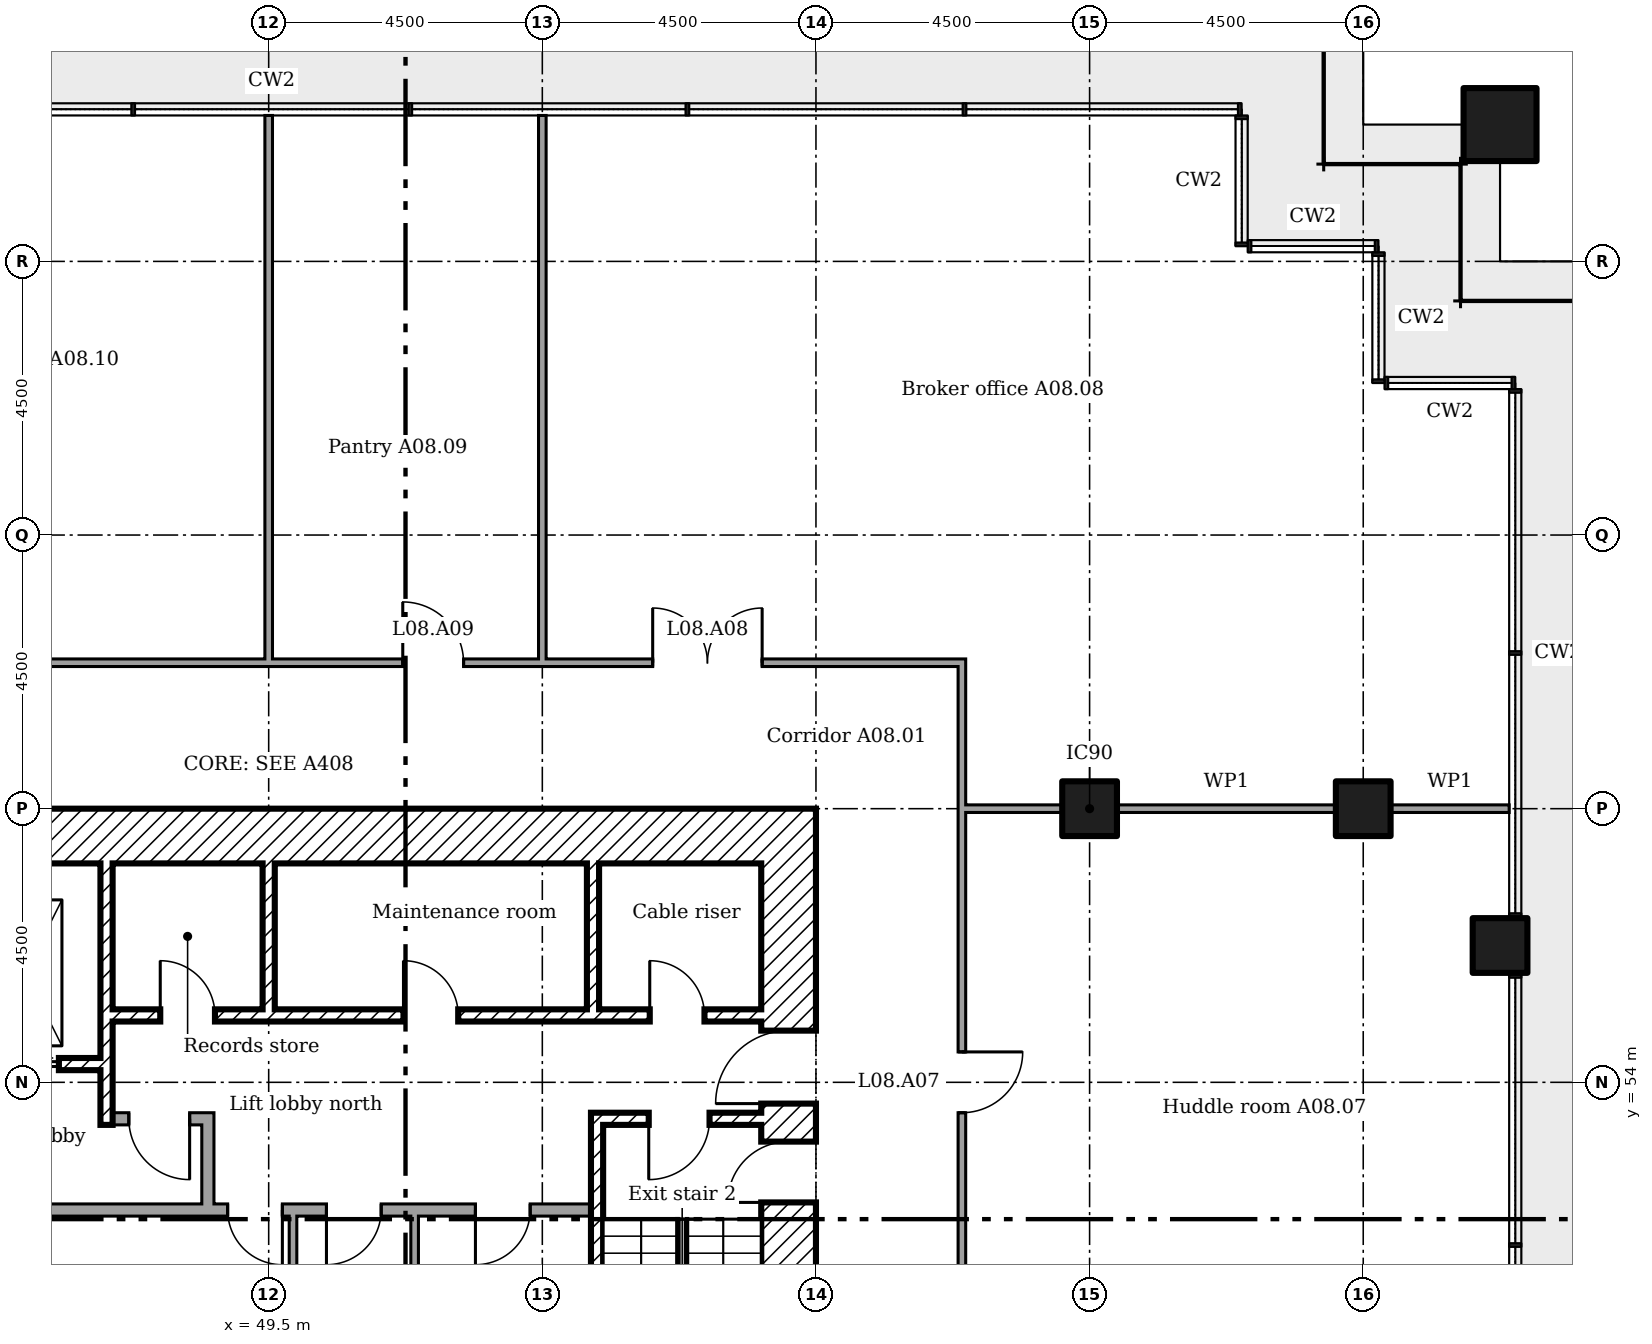
"""IFC4 building model, lengths in metres.
Left out: names, types, materials, properties, quantities, classifications, styles, units other than length and angle.
Written with IfcOpenShell. Run it as: python <this file> out.ifc"""

import sys

from ifc_helpers import new_model, si_unit, direction, frame, frame_2d, origin, origin_2d, place, context, subcontext, project, spatial, rectangle, extrude, element, fill, save


model = new_model("IFC4")
c1 = context("Model", 3, precision=1e-05, world=origin(), true_north=direction((0.0, 1.0)))
c2 = subcontext(c1, "Body", "Model", "MODEL_VIEW")
j1 = project(units=[si_unit("LENGTHUNIT", "METRE"), si_unit("PLANEANGLEUNIT", "RADIAN")], contexts=[c1])
p1 = place(None, origin())
s1 = spatial("IfcSite", under=j1, at=p1, CompositionType="ELEMENT")
p2 = place(p1, origin())
s2 = spatial("IfcBuilding", under=s1, at=p2, CompositionType="ELEMENT")
p3 = place(p2, frame((0.0, 0.0, 38.6)))
s3 = spatial("IfcBuildingStorey", under=s2, at=p3, CompositionType="ELEMENT", Elevation=38.6)
p4 = place(p3, frame((69.75, 69.75, 0.0)))
e1 = element("IfcColumn", 1, at=p4, inside=s3, PredefinedType="COLUMN", context=c2, shape_type="SweptSolid", body=[
    extrude(rectangle(XDim=1.2, YDim=1.2, at=origin_2d()), origin(), (0.0, 0.0, 1.0), 4.4),
])
for number, where in (
    (2, (63.0, 58.5, 0.0)),
    (3, (67.5, 58.5, 0.0)),
    (4, (69.75, 56.25, 0.0)),
):
    element("IfcColumn", number, at=place(p3, frame(where)), inside=s3, PredefinedType="COLUMN", context=c2, shape_type="SweptSolid", body=[
        extrude(rectangle(XDim=0.9, YDim=0.9, at=origin_2d()), origin(), (0.0, 0.0, 1.0), 4.4),
    ])
p5 = place(p3, frame((58.05, 40.5, 0.0), z_axis=(0.0, 0.0, 1.0), x_axis=(0.0, 1.0, 0.0)))
e5 = element("IfcWall", 5, at=p5, inside=s3, PredefinedType="SHEAR", context=c2, shape_type="SweptSolid", body=[
    extrude(rectangle(XDim=18.0, YDim=0.9, at=frame_2d((9.0, 0.0))), origin(), (0.0, 0.0, 1.0), 4.125),
])
p6 = place(p5, frame((13.15, 0.0, 0.0)))
e6 = element("IfcOpeningElement", 6, at=p6, cuts=e5, PredefinedType="OPENING", context=c2, shape_type="SweptSolid", body=[
    extrude(rectangle(XDim=1.2, YDim=2.1, at=frame_2d((0.6, 1.05))), frame((0.0, 0.46, 0.0), z_axis=(0.0, -1.0, 0.0), x_axis=(1.0, 0.0, 0.0)), (0.0, 0.0, 1.0), 0.92),
])
p7 = place(p5, frame((3.9, 0.0, 0.0)))
e7 = element("IfcOpeningElement", 7, at=p7, cuts=e5, PredefinedType="OPENING", context=c2, shape_type="SweptSolid", body=[
    extrude(rectangle(XDim=1.8, YDim=2.1, at=frame_2d((0.9, 1.05))), frame((0.0, 0.46, 0.0), z_axis=(0.0, -1.0, 0.0), x_axis=(1.0, 0.0, 0.0)), (0.0, 0.0, 1.0), 0.92),
])
p8 = place(p5, frame((11.525, 0.0, 0.0)))
e8 = element("IfcOpeningElement", 8, at=p8, cuts=e5, PredefinedType="OPENING", context=c2, shape_type="SweptSolid", body=[
    extrude(rectangle(XDim=1.0, YDim=2.1, at=frame_2d((0.5, 1.05))), frame((0.0, 0.46, 0.0), z_axis=(0.0, -1.0, 0.0), x_axis=(1.0, 0.0, 0.0)), (0.0, 0.0, 1.0), 0.92),
])
p9 = place(p3, frame((41.4, 58.05, 0.0)))
e9 = element("IfcWall", 9, at=p9, inside=s3, PredefinedType="SHEAR", context=c2, shape_type="SweptSolid", body=[
    extrude(rectangle(XDim=16.2, YDim=0.9, at=frame_2d((8.1, 0.0))), origin(), (0.0, 0.0, 1.0), 4.125),
])
p10 = place(p3, frame((46.833, 57.6, 0.0), z_axis=(0.0, 0.0, 1.0), x_axis=(0.0, -1.0, 0.0)))
e10 = element("IfcWall", 10, at=p10, inside=s3, PredefinedType="SHEAR", context=c2, shape_type="SweptSolid", body=[
    extrude(rectangle(XDim=4.3, YDim=0.2, at=frame_2d((2.15, 0.0))), origin(), (0.0, 0.0, 1.0), 4.125),
])
for number, where, z_axis, x_axis in (
    (11, (49.5, 57.6, 0.0), (0.0, 0.0, 1.0), (0.0, -1.0, 0.0)),
    (12, (54.833, 57.6, 0.0), (0.0, 0.0, 1.0), (0.0, -1.0, 0.0)),
):
    element("IfcWall", number, at=place(p3, frame(where, z_axis=z_axis, x_axis=x_axis)), inside=s3, PredefinedType="SHEAR", context=c2, shape_type="SweptSolid", body=[
        extrude(rectangle(XDim=2.4, YDim=0.2, at=frame_2d((1.2, 0.0))), origin(), (0.0, 0.0, 1.0), 4.125),
    ])
p11 = place(p3, frame((48.5, 51.9, 0.0), z_axis=(0.0, 0.0, 1.0), x_axis=(0.0, 1.0, 0.0)))
e13 = element("IfcWall", 13, at=p11, inside=s3, PredefinedType="PARTITIONING", context=c2, shape_type="SweptSolid", body=[
    extrude(rectangle(XDim=1.6, YDim=0.2, at=frame_2d((0.8, 0.0))), origin(), (0.0, 0.0, 1.0), 4.125),
])
p12 = place(p3, frame((46.933, 53.4, 0.0)))
e14 = element("IfcWall", 14, at=p12, inside=s3, PredefinedType="PARTITIONING", context=c2, shape_type="SweptSolid", body=[
    extrude(rectangle(XDim=1.467, YDim=0.2, at=frame_2d((0.733, 0.0))), origin(), (0.0, 0.0, 1.0), 4.125),
])
p13 = place(p12, frame((0.267, 0.0, 0.0)))
e15 = element("IfcOpeningElement", 15, at=p13, cuts=e14, PredefinedType="OPENING", context=c2, shape_type="SweptSolid", body=[
    extrude(rectangle(XDim=1.0, YDim=2.1, at=frame_2d((0.5, 1.05))), frame((0.0, 0.11, 0.0), z_axis=(0.0, -1.0, 0.0), x_axis=(1.0, 0.0, 0.0)), (0.0, 0.0, 1.0), 0.22),
])
p14 = place(p3, frame((46.933, 55.1, 0.0)))
e16 = element("IfcWall", 16, at=p14, inside=s3, PredefinedType="SHEAR", context=c2, shape_type="SweptSolid", body=[
    extrude(rectangle(XDim=10.667, YDim=0.2, at=frame_2d((5.333, 0.0))), origin(), (0.0, 0.0, 1.0), 4.125),
])
p15 = place(p14, frame((8.833, 0.0, 0.0)))
e17 = element("IfcOpeningElement", 17, at=p15, cuts=e16, PredefinedType="OPENING", context=c2, shape_type="SweptSolid", body=[
    extrude(rectangle(XDim=0.9, YDim=2.1, at=frame_2d((0.45, 1.05))), frame((0.0, 0.11, 0.0), z_axis=(0.0, -1.0, 0.0), x_axis=(1.0, 0.0, 0.0)), (0.0, 0.0, 1.0), 0.22),
])
p16 = place(p14, frame((0.783, 0.0, 0.0)))
e18 = element("IfcOpeningElement", 18, at=p16, cuts=e16, PredefinedType="OPENING", context=c2, shape_type="SweptSolid", body=[
    extrude(rectangle(XDim=0.9, YDim=2.1, at=frame_2d((0.45, 1.05))), frame((0.0, 0.11, 0.0), z_axis=(0.0, -1.0, 0.0), x_axis=(1.0, 0.0, 0.0)), (0.0, 0.0, 1.0), 0.22),
])
p17 = place(p14, frame((4.783, 0.0, 0.0)))
e19 = element("IfcOpeningElement", 19, at=p17, cuts=e16, PredefinedType="OPENING", context=c2, shape_type="SweptSolid", body=[
    extrude(rectangle(XDim=0.9, YDim=2.1, at=frame_2d((0.45, 1.05))), frame((0.0, 0.11, 0.0), z_axis=(0.0, -1.0, 0.0), x_axis=(1.0, 0.0, 0.0)), (0.0, 0.0, 1.0), 0.22),
])
p18 = place(p3, frame((41.4, 54.3, 0.0)))
e20 = element("IfcWall", 20, at=p18, inside=s3, PredefinedType="SHEAR", context=c2, shape_type="SweptSolid", body=[
    extrude(rectangle(XDim=5.333, YDim=0.2, at=frame_2d((2.667, 0.0))), origin(), (0.0, 0.0, 1.0), 4.125),
])
p19 = place(p18, frame((0.883, 0.0, 0.0)))
e21 = element("IfcOpeningElement", 21, at=p19, cuts=e20, PredefinedType="OPENING", context=c2, shape_type="SweptSolid", body=[
    extrude(rectangle(XDim=1.1, YDim=2.1, at=frame_2d((0.55, 1.05))), frame((0.0, 0.11, 0.0), z_axis=(0.0, -1.0, 0.0), x_axis=(1.0, 0.0, 0.0)), (0.0, 0.0, 1.0), 0.22),
])
p20 = place(p18, frame((3.55, 0.0, 0.0)))
e22 = element("IfcOpeningElement", 22, at=p20, cuts=e20, PredefinedType="OPENING", context=c2, shape_type="SweptSolid", body=[
    extrude(rectangle(XDim=1.1, YDim=2.1, at=frame_2d((0.55, 1.05))), frame((0.0, 0.11, 0.0), z_axis=(0.0, -1.0, 0.0), x_axis=(1.0, 0.0, 0.0)), (0.0, 0.0, 1.0), 0.22),
])
p21 = place(p3, frame((54.8, 53.4, 0.0)))
e23 = element("IfcWall", 23, at=p21, inside=s3, PredefinedType="SHEAR", context=c2, shape_type="SweptSolid", body=[
    extrude(rectangle(XDim=2.8, YDim=0.2, at=frame_2d((1.4, 0.0))), origin(), (0.0, 0.0, 1.0), 4.125),
])
p22 = place(p21, frame((0.95, 0.0, 0.0)))
e24 = element("IfcOpeningElement", 24, at=p22, cuts=e23, PredefinedType="OPENING", context=c2, shape_type="SweptSolid", body=[
    extrude(rectangle(XDim=1.0, YDim=2.1, at=frame_2d((0.5, 1.05))), frame((0.0, 0.11, 0.0), z_axis=(0.0, -1.0, 0.0), x_axis=(1.0, 0.0, 0.0)), (0.0, 0.0, 1.0), 0.22),
])
p23 = place(p3, frame((54.9, 46.8, 0.0), z_axis=(0.0, 0.0, 1.0), x_axis=(0.0, 1.0, 0.0)))
e25 = element("IfcWall", 25, at=p23, inside=s3, PredefinedType="SHEAR", context=c2, shape_type="SweptSolid", body=[
    extrude(rectangle(XDim=6.5, YDim=0.2, at=frame_2d((3.25, 0.0))), origin(), (0.0, 0.0, 1.0), 4.125),
])
p24 = place(p3, frame((44.2, 51.9, 0.0)))
e26 = element("IfcWall", 26, at=p24, inside=s3, PredefinedType="PARTITIONING", context=c2, shape_type="SweptSolid", body=[
    extrude(rectangle(XDim=10.6, YDim=0.2, at=frame_2d((5.3, 0.0))), origin(), (0.0, 0.0, 1.0), 4.125),
])
p25 = place(p24, frame((4.625, 0.0, 0.0)))
e27 = element("IfcOpeningElement", 27, at=p25, cuts=e26, PredefinedType="OPENING", context=c2, shape_type="SweptSolid", body=[
    extrude(rectangle(XDim=0.9, YDim=2.1, at=frame_2d((0.45, 1.05))), frame((0.0, 0.11, 0.0), z_axis=(0.0, -1.0, 0.0), x_axis=(1.0, 0.0, 0.0)), (0.0, 0.0, 1.0), 0.22),
])
p26 = place(p24, frame((6.25, 0.0, 0.0)))
e28 = element("IfcOpeningElement", 28, at=p26, cuts=e26, PredefinedType="OPENING", context=c2, shape_type="SweptSolid", body=[
    extrude(rectangle(XDim=0.9, YDim=2.1, at=frame_2d((0.45, 1.05))), frame((0.0, 0.11, 0.0), z_axis=(0.0, -1.0, 0.0), x_axis=(1.0, 0.0, 0.0)), (0.0, 0.0, 1.0), 0.22),
])
p27 = place(p24, frame((8.7, 0.0, 0.0)))
e29 = element("IfcOpeningElement", 29, at=p27, cuts=e26, PredefinedType="OPENING", context=c2, shape_type="SweptSolid", body=[
    extrude(rectangle(XDim=0.9, YDim=2.1, at=frame_2d((0.45, 1.05))), frame((0.0, 0.11, 0.0), z_axis=(0.0, -1.0, 0.0), x_axis=(1.0, 0.0, 0.0)), (0.0, 0.0, 1.0), 0.22),
])
for number, where, z_axis, x_axis in (
    (30, (49.9, 48.163, 0.0), (0.0, 0.0, 1.0), (0.0, 1.0, 0.0)),
    (31, (51.9, 48.163, 0.0), (0.0, 0.0, 1.0), (0.0, 1.0, 0.0)),
):
    element("IfcWall", number, at=place(p3, frame(where, z_axis=z_axis, x_axis=x_axis)), inside=s3, PredefinedType="PARTITIONING", context=c2, shape_type="SweptSolid", body=[
        extrude(rectangle(XDim=3.637, YDim=0.125, at=frame_2d((1.819, 0.0))), origin(), (0.0, 0.0, 1.0), 4.125),
    ])
p28 = place(p3, frame((60.9, 58.5, 0.0)))
e32 = element("IfcWall", 32, at=p28, inside=s3, PredefinedType="PARTITIONING", context=c2, shape_type="SweptSolid", body=[
    extrude(rectangle(XDim=1.65, YDim=0.125, at=frame_2d((0.825, 0.0))), origin(), (0.0, 0.0, 1.0), 3.302),
])
p29 = place(p3, frame((63.45, 58.5, 0.0)))
e33 = element("IfcWall", 33, at=p29, inside=s3, PredefinedType="PARTITIONING", context=c2, shape_type="SweptSolid", body=[
    extrude(rectangle(XDim=3.6, YDim=0.125, at=frame_2d((1.8, 0.0))), origin(), (0.0, 0.0, 1.0), 3.302),
])
p30 = place(p3, frame((67.95, 58.5, 0.0)))
e34 = element("IfcWall", 34, at=p30, inside=s3, PredefinedType="PARTITIONING", context=c2, shape_type="SweptSolid", body=[
    extrude(rectangle(XDim=1.95, YDim=0.125, at=frame_2d((0.975, 0.0))), origin(), (0.0, 0.0, 1.0), 3.302),
])
p31 = place(p3, frame((38.038, 60.9, 0.0)))
e35 = element("IfcWall", 35, at=p31, inside=s3, PredefinedType="PARTITIONING", context=c2, shape_type="SweptSolid", body=[
    extrude(rectangle(XDim=22.925, YDim=0.125, at=frame_2d((11.462, 0.0))), origin(), (0.0, 0.0, 1.0), 4.225),
])
p32 = place(p31, frame((17.778, 0.0, 0.0)))
e36 = element("IfcOpeningElement", 36, at=p32, cuts=e35, PredefinedType="OPENING", context=c2, shape_type="SweptSolid", body=[
    extrude(rectangle(XDim=1.8, YDim=2.1, at=frame_2d((0.9, 1.05))), frame((0.0, 0.073, 0.0), z_axis=(0.0, -1.0, 0.0), x_axis=(1.0, 0.0, 0.0)), (0.0, 0.0, 1.0), 0.145),
])
p33 = place(p31, frame((13.667, 0.0, 0.0)))
e37 = element("IfcOpeningElement", 37, at=p33, cuts=e35, PredefinedType="OPENING", context=c2, shape_type="SweptSolid", body=[
    extrude(rectangle(XDim=1.0, YDim=2.1, at=frame_2d((0.5, 1.05))), frame((0.0, 0.073, 0.0), z_axis=(0.0, -1.0, 0.0), x_axis=(1.0, 0.0, 0.0)), (0.0, 0.0, 1.0), 0.145),
])
p34 = place(p31, frame((6.462, 0.0, 0.0)))
e38 = element("IfcOpeningElement", 38, at=p34, cuts=e35, PredefinedType="OPENING", context=c2, shape_type="SweptSolid", body=[
    extrude(rectangle(XDim=1.0, YDim=2.1, at=frame_2d((0.5, 1.05))), frame((0.0, 0.073, 0.0), z_axis=(0.0, -1.0, 0.0), x_axis=(1.0, 0.0, 0.0)), (0.0, 0.0, 1.0), 0.145),
])
for number, where, z_axis, x_axis in (
    (39, (49.5, 60.9, 0.0), (0.0, 0.0, 1.0), (0.0, 1.0, 0.0)),
    (40, (54.0, 60.9, 0.0), (0.0, 0.0, 1.0), (0.0, 1.0, 0.0)),
):
    element("IfcWall", number, at=place(p3, frame(where, z_axis=z_axis, x_axis=x_axis)), inside=s3, PredefinedType="PARTITIONING", context=c2, shape_type="SweptSolid", body=[
        extrude(rectangle(XDim=9.0, YDim=0.125, at=frame_2d((4.5, 0.0))), origin(), (0.0, 0.0, 1.0), 3.467),
    ])
p35 = place(p3, frame((60.9, 37.863, 0.0), z_axis=(0.0, 0.0, 1.0), x_axis=(0.0, 1.0, 0.0)))
e41 = element("IfcWall", 41, at=p35, inside=s3, PredefinedType="PARTITIONING", context=c2, shape_type="SweptSolid", body=[
    extrude(rectangle(XDim=22.975, YDim=0.125, at=frame_2d((11.487, 0.0))), origin(), (0.0, 0.0, 1.0), 4.225),
])
p36 = place(p35, frame((3.933, 0.0, 0.0)))
e42 = element("IfcOpeningElement", 42, at=p36, cuts=e41, PredefinedType="OPENING", context=c2, shape_type="SweptSolid", body=[
    extrude(rectangle(XDim=1.0, YDim=2.1, at=frame_2d((0.5, 1.05))), frame((0.0, 0.073, 0.0), z_axis=(0.0, -1.0, 0.0), x_axis=(1.0, 0.0, 0.0)), (0.0, 0.0, 1.0), 0.145),
])
p37 = place(p35, frame((9.343, 0.0, 0.0)))
e43 = element("IfcOpeningElement", 43, at=p37, cuts=e41, PredefinedType="OPENING", context=c2, shape_type="SweptSolid", body=[
    extrude(rectangle(XDim=1.0, YDim=2.1, at=frame_2d((0.5, 1.05))), frame((0.0, 0.073, 0.0), z_axis=(0.0, -1.0, 0.0), x_axis=(1.0, 0.0, 0.0)), (0.0, 0.0, 1.0), 0.145),
])
p38 = place(p35, frame((15.637, 0.0, 0.0)))
e44 = element("IfcOpeningElement", 44, at=p38, cuts=e41, PredefinedType="OPENING", context=c2, shape_type="SweptSolid", body=[
    extrude(rectangle(XDim=1.0, YDim=2.1, at=frame_2d((0.5, 1.05))), frame((0.0, 0.073, 0.0), z_axis=(0.0, -1.0, 0.0), x_axis=(1.0, 0.0, 0.0)), (0.0, 0.0, 1.0), 0.145),
])
p39 = place(p6, origin())
e45 = element("IfcDoor", 45, at=p39, inside=s3, OperationType="SINGLE_SWING_RIGHT", PredefinedType="DOOR", context=c2, shape_type="SweptSolid", body=[
    extrude(rectangle(XDim=1.2, YDim=2.1, at=frame_2d((0.6, 1.05))), frame((0.0, 0.025, 0.0), z_axis=(0.0, -1.0, 0.0), x_axis=(1.0, 0.0, 0.0)), (0.0, 0.0, 1.0), 0.05),
])
fill(e6, e45)
p40 = place(p22, frame((1.0, 0.0, 0.0), x_axis=(-1.0, 0.0, 0.0)))
e46 = element("IfcDoor", 46, at=p40, inside=s3, OperationType="SINGLE_SWING_LEFT", PredefinedType="DOOR", context=c2, shape_type="SweptSolid", body=[
    extrude(rectangle(XDim=1.0, YDim=2.1, at=frame_2d((0.5, 1.05))), frame((0.0, 0.025, 0.0), z_axis=(0.0, -1.0, 0.0), x_axis=(1.0, 0.0, 0.0)), (0.0, 0.0, 1.0), 0.05),
])
fill(e24, e46)
p41 = place(p8, origin())
e47 = element("IfcDoor", 47, at=p41, inside=s3, OperationType="SINGLE_SWING_RIGHT", PredefinedType="DOOR", context=c2, shape_type="SweptSolid", body=[
    extrude(rectangle(XDim=1.0, YDim=2.1, at=frame_2d((0.5, 1.05))), frame((0.0, 0.025, 0.0), z_axis=(0.0, -1.0, 0.0), x_axis=(1.0, 0.0, 0.0)), (0.0, 0.0, 1.0), 0.05),
])
fill(e8, e47)
p42 = place(p13, frame((1.0, 0.0, 0.0), x_axis=(-1.0, 0.0, 0.0)))
e48 = element("IfcDoor", 48, at=p42, inside=s3, OperationType="SINGLE_SWING_RIGHT", PredefinedType="DOOR", context=c2, shape_type="SweptSolid", body=[
    extrude(rectangle(XDim=1.0, YDim=2.1, at=frame_2d((0.5, 1.05))), frame((0.0, 0.025, 0.0), z_axis=(0.0, -1.0, 0.0), x_axis=(1.0, 0.0, 0.0)), (0.0, 0.0, 1.0), 0.05),
])
fill(e15, e48)
p43 = place(p15, origin())
e49 = element("IfcDoor", 49, at=p43, inside=s3, OperationType="SINGLE_SWING_RIGHT", PredefinedType="DOOR", context=c2, shape_type="SweptSolid", body=[
    extrude(rectangle(XDim=0.9, YDim=2.1, at=frame_2d((0.45, 1.05))), frame((0.0, 0.025, 0.0), z_axis=(0.0, -1.0, 0.0), x_axis=(1.0, 0.0, 0.0)), (0.0, 0.0, 1.0), 0.05),
])
fill(e17, e49)
p44 = place(p16, origin())
e50 = element("IfcDoor", 50, at=p44, inside=s3, OperationType="SINGLE_SWING_RIGHT", PredefinedType="DOOR", context=c2, shape_type="SweptSolid", body=[
    extrude(rectangle(XDim=0.9, YDim=2.1, at=frame_2d((0.45, 1.05))), frame((0.0, 0.025, 0.0), z_axis=(0.0, -1.0, 0.0), x_axis=(1.0, 0.0, 0.0)), (0.0, 0.0, 1.0), 0.05),
])
fill(e18, e50)
p45 = place(p17, origin())
e51 = element("IfcDoor", 51, at=p45, inside=s3, OperationType="SINGLE_SWING_RIGHT", PredefinedType="DOOR", context=c2, shape_type="SweptSolid", body=[
    extrude(rectangle(XDim=0.9, YDim=2.1, at=frame_2d((0.45, 1.05))), frame((0.0, 0.025, 0.0), z_axis=(0.0, -1.0, 0.0), x_axis=(1.0, 0.0, 0.0)), (0.0, 0.0, 1.0), 0.05),
])
fill(e19, e51)
p46 = place(p25, frame((0.9, 0.0, 0.0), x_axis=(-1.0, 0.0, 0.0)))
e52 = element("IfcDoor", 52, at=p46, inside=s3, OperationType="SINGLE_SWING_RIGHT", PredefinedType="DOOR", context=c2, shape_type="SweptSolid", body=[
    extrude(rectangle(XDim=0.9, YDim=2.1, at=frame_2d((0.45, 1.05))), frame((0.0, 0.025, 0.0), z_axis=(0.0, -1.0, 0.0), x_axis=(1.0, 0.0, 0.0)), (0.0, 0.0, 1.0), 0.05),
])
fill(e27, e52)
p47 = place(p26, frame((0.9, 0.0, 0.0), x_axis=(-1.0, 0.0, 0.0)))
e53 = element("IfcDoor", 53, at=p47, inside=s3, OperationType="SINGLE_SWING_LEFT", PredefinedType="DOOR", context=c2, shape_type="SweptSolid", body=[
    extrude(rectangle(XDim=0.9, YDim=2.1, at=frame_2d((0.45, 1.05))), frame((0.0, 0.025, 0.0), z_axis=(0.0, -1.0, 0.0), x_axis=(1.0, 0.0, 0.0)), (0.0, 0.0, 1.0), 0.05),
])
fill(e28, e53)
p48 = place(p27, frame((0.9, 0.0, 0.0), x_axis=(-1.0, 0.0, 0.0)))
e54 = element("IfcDoor", 54, at=p48, inside=s3, OperationType="SINGLE_SWING_LEFT", PredefinedType="DOOR", context=c2, shape_type="SweptSolid", body=[
    extrude(rectangle(XDim=0.9, YDim=2.1, at=frame_2d((0.45, 1.05))), frame((0.0, 0.025, 0.0), z_axis=(0.0, -1.0, 0.0), x_axis=(1.0, 0.0, 0.0)), (0.0, 0.0, 1.0), 0.05),
])
fill(e29, e54)
p49 = place(p20, origin())
e55 = element("IfcDoor", 55, at=p49, inside=s3, OperationType="SLIDING_TO_LEFT", PredefinedType="DOOR", context=c2, shape_type="SweptSolid", body=[
    extrude(rectangle(XDim=1.1, YDim=2.1, at=frame_2d((0.55, 1.05))), frame((0.0, 0.025, 0.0), z_axis=(0.0, -1.0, 0.0), x_axis=(1.0, 0.0, 0.0)), (0.0, 0.0, 1.0), 0.05),
])
fill(e22, e55)
p50 = place(p38, frame((1.0, 0.0, 0.0), x_axis=(-1.0, 0.0, 0.0)))
e56 = element("IfcDoor", 56, at=p50, inside=s3, OperationType="SINGLE_SWING_RIGHT", PredefinedType="DOOR", context=c2, shape_type="SweptSolid", body=[
    extrude(rectangle(XDim=1.0, YDim=2.1, at=frame_2d((0.5, 1.05))), frame((0.0, 0.025, 0.0), z_axis=(0.0, -1.0, 0.0), x_axis=(1.0, 0.0, 0.0)), (0.0, 0.0, 1.0), 0.05),
])
fill(e44, e56)
p51 = place(p32, origin())
e57 = element("IfcDoor", 57, at=p51, inside=s3, OperationType="DOUBLE_DOOR_SINGLE_SWING", PredefinedType="DOOR", context=c2, shape_type="SweptSolid", body=[
    extrude(rectangle(XDim=1.8, YDim=2.1, at=frame_2d((0.9, 1.05))), frame((0.0, 0.025, 0.0), z_axis=(0.0, -1.0, 0.0), x_axis=(1.0, 0.0, 0.0)), (0.0, 0.0, 1.0), 0.05),
])
fill(e36, e57)
p52 = place(p33, origin())
e58 = element("IfcDoor", 58, at=p52, inside=s3, OperationType="SINGLE_SWING_RIGHT", PredefinedType="DOOR", context=c2, shape_type="SweptSolid", body=[
    extrude(rectangle(XDim=1.0, YDim=2.1, at=frame_2d((0.5, 1.05))), frame((0.0, 0.025, 0.0), z_axis=(0.0, -1.0, 0.0), x_axis=(1.0, 0.0, 0.0)), (0.0, 0.0, 1.0), 0.05),
])
fill(e37, e58)
save(model, sys.argv[1])
